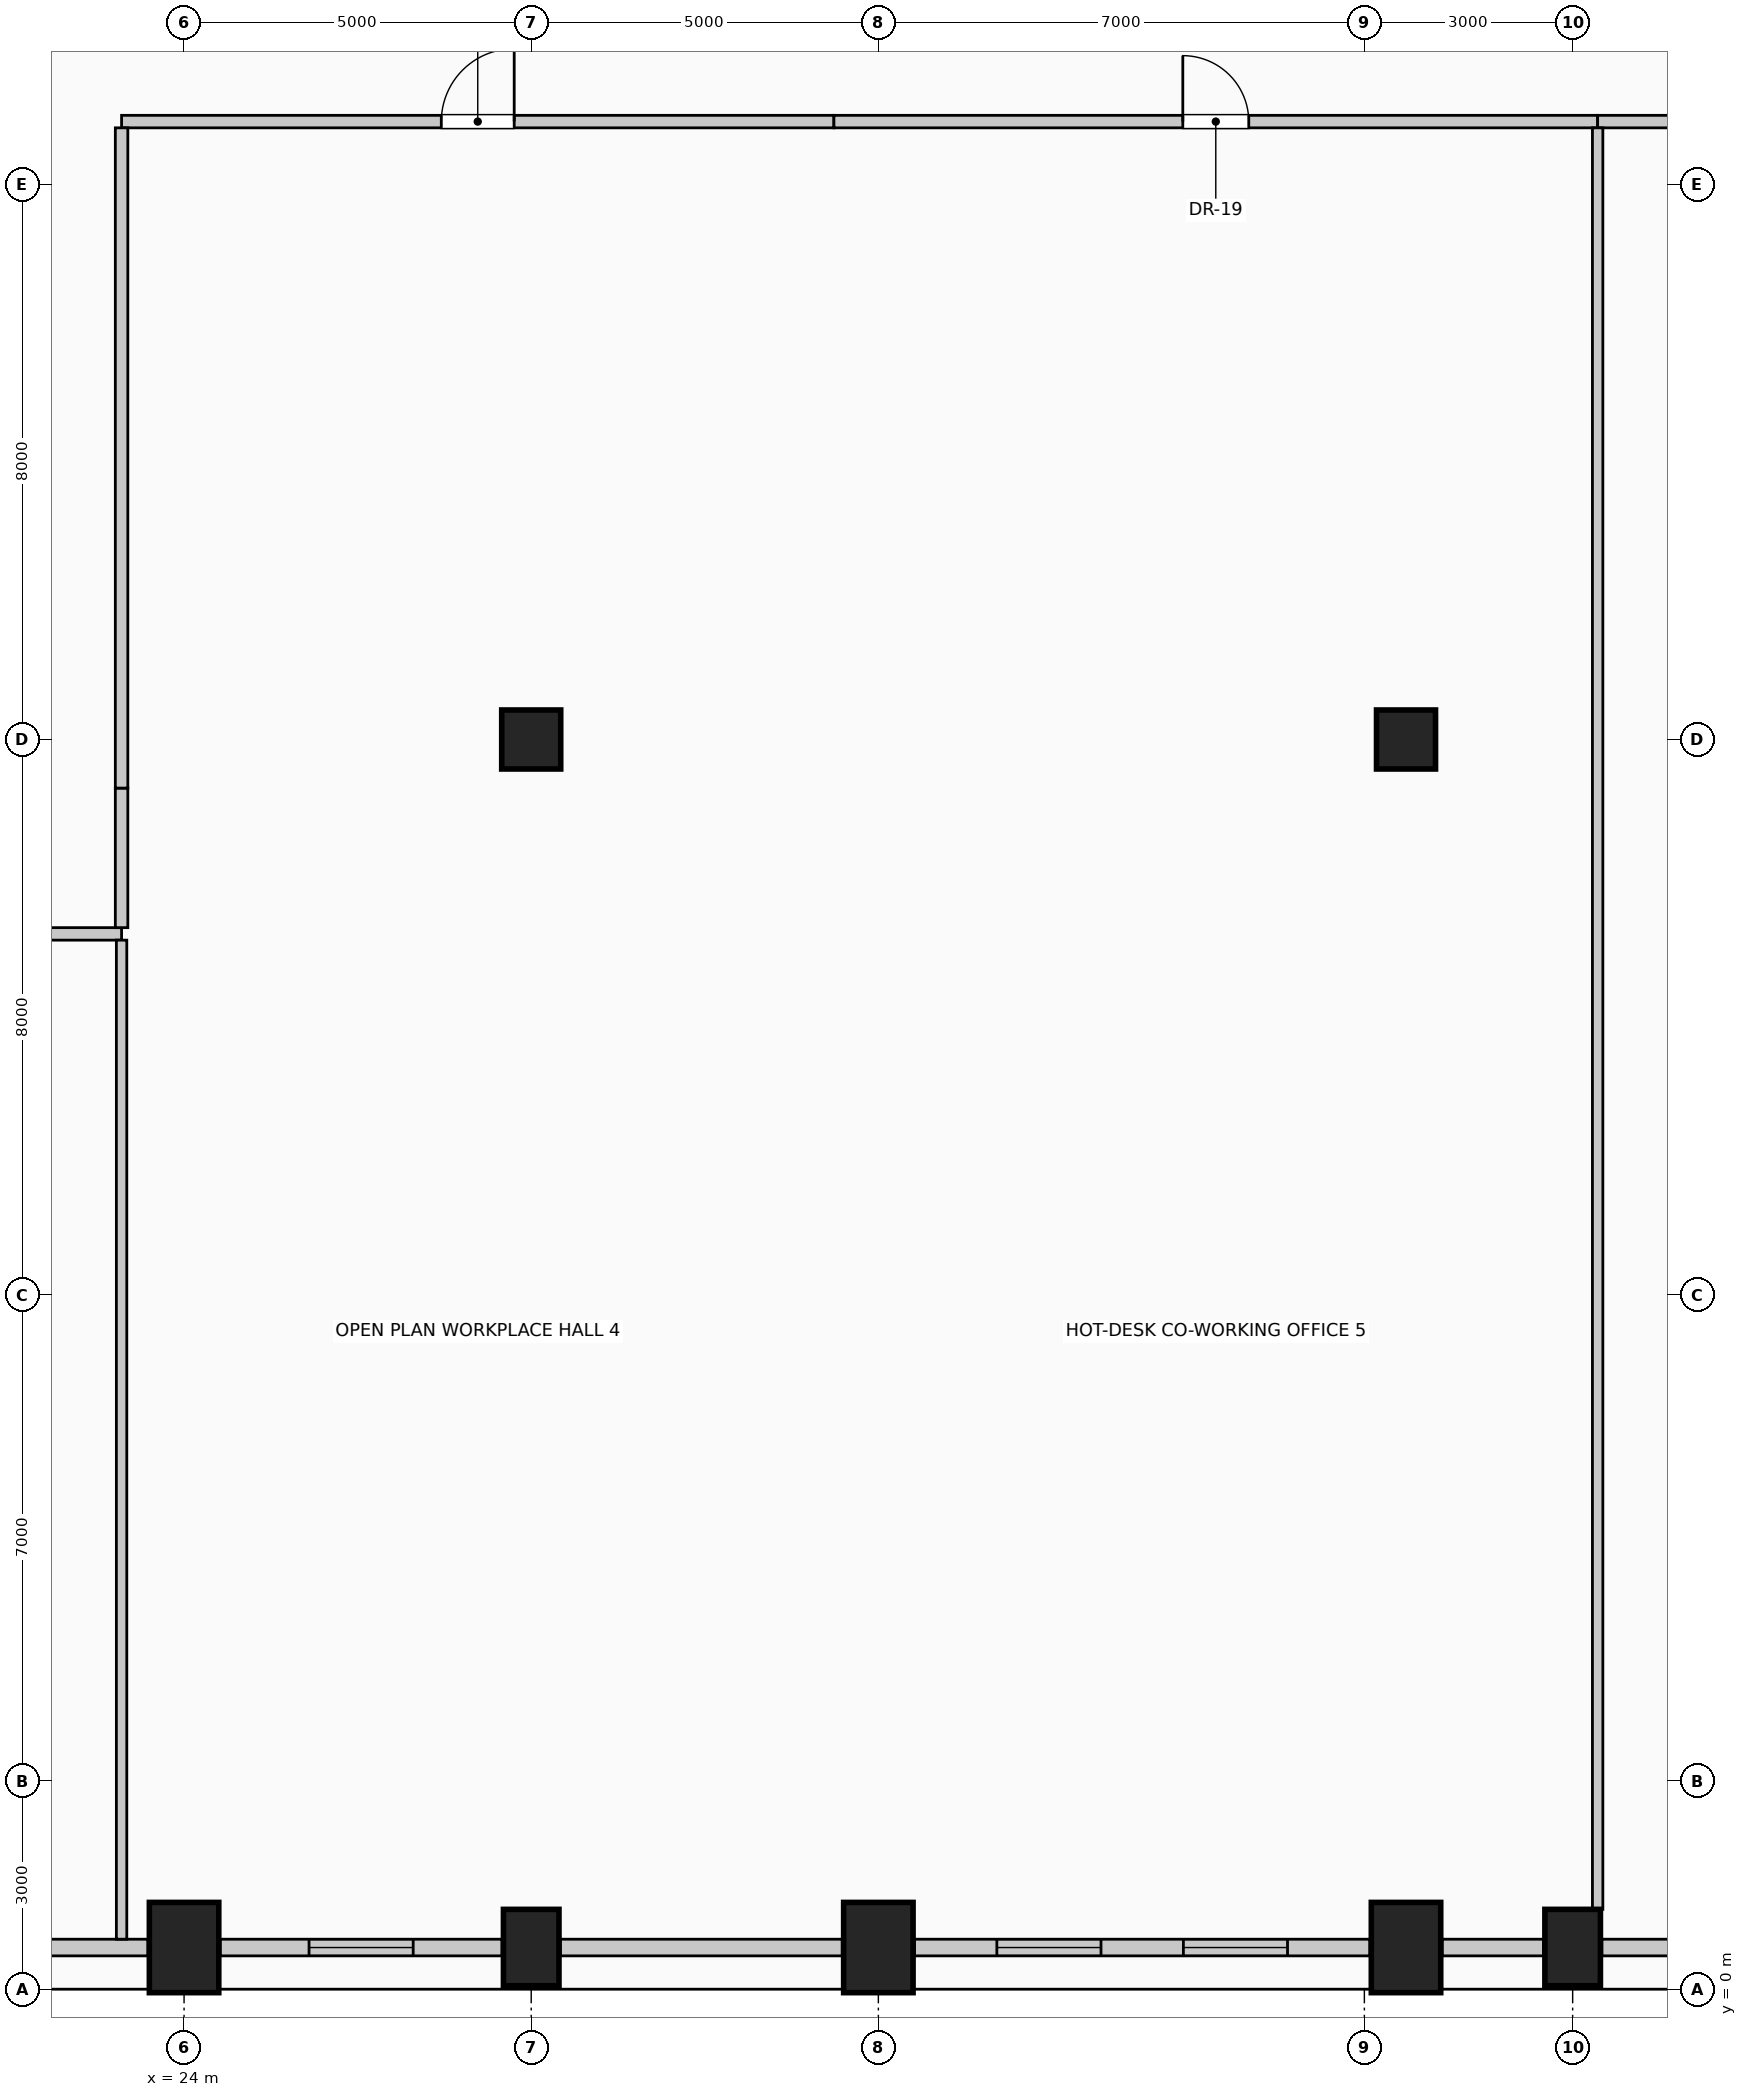
"""IFC4 building model, lengths in metres.
Left out: names, types, materials, properties, quantities, classifications, styles, units other than length and angle.
Written with IfcOpenShell. Run it as: python <this file> out.ifc"""

import sys

from ifc_helpers import new_model, si_unit, direction, frame, frame_2d, origin, origin_2d, place, context, subcontext, project, spatial, rectangle, circle, extrude, element, fill, save


model = new_model("IFC4")
c1 = context("Model", 3, precision=1e-05, world=origin(), true_north=direction((0.0, 1.0)))
c2 = subcontext(c1, "Body", "Model", "MODEL_VIEW")
j1 = project(units=[si_unit("LENGTHUNIT", "METRE"), si_unit("PLANEANGLEUNIT", "RADIAN")], contexts=[c1])
p1 = place(None, origin())
s1 = spatial("IfcSite", under=j1, at=p1, CompositionType="ELEMENT")
p2 = place(p1, origin())
s2 = spatial("IfcBuilding", under=s1, at=p2, CompositionType="ELEMENT")
p3 = place(p2, frame((0.0, 0.0, 178.6)))
s3 = spatial("IfcBuildingStorey", under=s2, at=p3, CompositionType="ELEMENT", Elevation=178.6)
p4 = place(p3, frame((24.0, 0.6, 0.0), z_axis=(0.0, 0.0, 1.0), x_axis=(1.0, 0.0, 0.0)))
e1 = element("IfcColumn", 1, at=p4, inside=s3, PredefinedType="COLUMN", context=c2, shape_type="SweptSolid", body=[
    extrude(rectangle(XDim=1.0, YDim=1.3, at=origin_2d()), origin(), (0.0, 0.0, 1.0), 4.0),
])
p5 = place(p3, frame((29.0, 0.6, 0.0), z_axis=(0.0, 0.0, 1.0), x_axis=(1.0, 0.0, 0.0)))
e2 = element("IfcColumn", 2, at=p5, inside=s3, PredefinedType="COLUMN", context=c2, shape_type="SweptSolid", body=[
    extrude(rectangle(XDim=0.8, YDim=1.1, at=origin_2d()), origin(), (0.0, 0.0, 1.0), 4.0),
])
for number, where, z_axis, x_axis in (
    (3, (34.0, 0.6, 0.0), (0.0, 0.0, 1.0), (1.0, 0.0, 0.0)),
    (4, (41.6, 0.6, 0.0), (0.0, 0.0, 1.0), (1.0, 0.0, 0.0)),
):
    element("IfcColumn", number, at=place(p3, frame(where, z_axis=z_axis, x_axis=x_axis)), inside=s3, PredefinedType="COLUMN", context=c2, shape_type="SweptSolid", body=[
        extrude(rectangle(XDim=1.0, YDim=1.3, at=origin_2d()), origin(), (0.0, 0.0, 1.0), 4.0),
    ])
p6 = place(p3, frame((44.0, 0.6, 0.0), z_axis=(0.0, 0.0, 1.0), x_axis=(1.0, 0.0, 0.0)))
e5 = element("IfcColumn", 5, at=p6, inside=s3, PredefinedType="COLUMN", context=c2, shape_type="SweptSolid", body=[
    extrude(rectangle(XDim=0.8, YDim=1.1, at=origin_2d()), origin(), (0.0, 0.0, 1.0), 4.0),
])
for number, where, z_axis, x_axis in (
    (6, (29.0, 18.0, 0.0), (0.0, 0.0, 1.0), (1.0, 0.0, 0.0)),
    (7, (41.6, 18.0, 0.0), (0.0, 0.0, 1.0), (1.0, 0.0, 0.0)),
):
    element("IfcColumn", number, at=place(p3, frame(where, z_axis=z_axis, x_axis=x_axis)), inside=s3, PredefinedType="COLUMN", context=c2, shape_type="SweptSolid", body=[
        extrude(circle(Radius=0.425, at=origin_2d()), origin(), (0.0, 0.0, 1.0), 4.0),
    ])
p7 = place(p3, frame((23.48, 0.6, 0.0), z_axis=(0.0, 0.0, 1.0), x_axis=(-1.0, 0.0, 0.0)))
e8 = element("IfcWall", 8, at=p7, inside=s3, PredefinedType="SOLIDWALL", context=c2, shape_type="SweptSolid", body=[
    extrude(rectangle(XDim=6.56, YDim=0.24, at=frame_2d((3.28, 0.0))), origin(), (0.0, 0.0, 1.0), 3.0),
])
p8 = place(p7, frame((3.873, 0.0, 0.42)))
e9 = element("IfcOpeningElement", 9, at=p8, cuts=e8, PredefinedType="OPENING", context=c2, shape_type="SweptSolid", body=[
    extrude(rectangle(XDim=1.5, YDim=2.2, at=frame_2d((0.75, 1.1))), frame((0.0, 0.13, 0.0), z_axis=(0.0, -1.0, 0.0), x_axis=(1.0, 0.0, 0.0)), (0.0, 0.0, 1.0), 0.26),
])
p9 = place(p3, frame((28.58, 0.6, 0.0), z_axis=(0.0, 0.0, 1.0), x_axis=(-1.0, 0.0, 0.0)))
e10 = element("IfcWall", 10, at=p9, inside=s3, PredefinedType="SOLIDWALL", context=c2, shape_type="SweptSolid", body=[
    extrude(rectangle(XDim=4.06, YDim=0.24, at=frame_2d((2.03, 0.0))), origin(), (0.0, 0.0, 1.0), 3.75),
])
p10 = place(p9, frame((1.28, 0.0, 0.42)))
e11 = element("IfcOpeningElement", 11, at=p10, cuts=e10, PredefinedType="OPENING", context=c2, shape_type="SweptSolid", body=[
    extrude(rectangle(XDim=1.5, YDim=2.2, at=frame_2d((0.75, 1.1))), frame((0.0, 0.13, 0.0), z_axis=(0.0, -1.0, 0.0), x_axis=(1.0, 0.0, 0.0)), (0.0, 0.0, 1.0), 0.26),
])
p11 = place(p3, frame((33.48, 0.6, 0.0), z_axis=(0.0, 0.0, 1.0), x_axis=(-1.0, 0.0, 0.0)))
e12 = element("IfcWall", 12, at=p11, inside=s3, PredefinedType="SOLIDWALL", context=c2, shape_type="SweptSolid", body=[
    extrude(rectangle(XDim=4.06, YDim=0.24, at=frame_2d((2.03, 0.0))), origin(), (0.0, 0.0, 1.0), 3.75),
])
p12 = place(p3, frame((41.08, 0.6, 0.0), z_axis=(0.0, 0.0, 1.0), x_axis=(-1.0, 0.0, 0.0)))
e13 = element("IfcWall", 13, at=p12, inside=s3, PredefinedType="SOLIDWALL", context=c2, shape_type="SweptSolid", body=[
    extrude(rectangle(XDim=6.56, YDim=0.24, at=frame_2d((3.28, 0.0))), origin(), (0.0, 0.0, 1.0), 3.0),
])
p13 = place(p12, frame((1.187, 0.0, 0.42)))
e14 = element("IfcOpeningElement", 14, at=p13, cuts=e13, PredefinedType="OPENING", context=c2, shape_type="SweptSolid", body=[
    extrude(rectangle(XDim=1.5, YDim=2.2, at=frame_2d((0.75, 1.1))), frame((0.0, 0.13, 0.0), z_axis=(0.0, -1.0, 0.0), x_axis=(1.0, 0.0, 0.0)), (0.0, 0.0, 1.0), 0.26),
])
p14 = place(p12, frame((3.873, 0.0, 0.42)))
e15 = element("IfcOpeningElement", 15, at=p14, cuts=e13, PredefinedType="OPENING", context=c2, shape_type="SweptSolid", body=[
    extrude(rectangle(XDim=1.5, YDim=2.2, at=frame_2d((0.75, 1.1))), frame((0.0, 0.13, 0.0), z_axis=(0.0, -1.0, 0.0), x_axis=(1.0, 0.0, 0.0)), (0.0, 0.0, 1.0), 0.26),
])
p15 = place(p3, frame((43.58, 0.6, 0.0), z_axis=(0.0, 0.0, 1.0), x_axis=(-1.0, 0.0, 0.0)))
e16 = element("IfcWall", 16, at=p15, inside=s3, PredefinedType="SOLIDWALL", context=c2, shape_type="SweptSolid", body=[
    extrude(rectangle(XDim=1.46, YDim=0.24, at=frame_2d((0.73, 0.0))), origin(), (0.0, 0.0, 1.0), 3.0),
])
p16 = place(p3, frame((49.08, 0.6, 0.0), z_axis=(0.0, 0.0, 1.0), x_axis=(-1.0, 0.0, 0.0)))
e17 = element("IfcWall", 17, at=p16, inside=s3, PredefinedType="SOLIDWALL", context=c2, shape_type="SweptSolid", body=[
    extrude(rectangle(XDim=4.66, YDim=0.24, at=frame_2d((2.33, 0.0))), origin(), (0.0, 0.0, 1.0), 3.0),
])
p17 = place(p3, frame((13.56, 15.2, 0.0), z_axis=(0.0, 0.0, 1.0), x_axis=(1.0, 0.0, 0.0)))
e18 = element("IfcWall", 18, at=p17, inside=s3, PredefinedType="PARTITIONING", context=c2, shape_type="SweptSolid", body=[
    extrude(rectangle(XDim=9.54, YDim=0.18, at=frame_2d((4.77, 0.0))), origin(), (0.0, 0.0, 1.0), 3.75),
])
p18 = place(p17, frame((4.295, 0.0, 0.0)))
e19 = element("IfcOpeningElement", 19, at=p18, cuts=e18, PredefinedType="OPENING", context=c2, shape_type="SweptSolid", body=[
    extrude(rectangle(XDim=0.95, YDim=2.15, at=frame_2d((0.475, 1.075))), frame((0.0, 0.1, 0.0), z_axis=(0.0, -1.0, 0.0), x_axis=(1.0, 0.0, 0.0)), (0.0, 0.0, 1.0), 0.2),
])
p19 = place(p3, frame((23.1, 26.9, 0.0), z_axis=(0.0, 0.0, 1.0), x_axis=(1.0, 0.0, 0.0)))
e20 = element("IfcWall", 20, at=p19, inside=s3, PredefinedType="PARTITIONING", context=c2, shape_type="SweptSolid", body=[
    extrude(rectangle(XDim=10.26, YDim=0.18, at=frame_2d((5.13, 0.0))), origin(), (0.0, 0.0, 1.0), 3.75),
])
p20 = place(p19, frame((4.605, 0.0, 0.0)))
e21 = element("IfcOpeningElement", 21, at=p20, cuts=e20, PredefinedType="OPENING", context=c2, shape_type="SweptSolid", body=[
    extrude(rectangle(XDim=1.05, YDim=2.15, at=frame_2d((0.525, 1.075))), frame((0.0, 0.1, 0.0), z_axis=(0.0, -1.0, 0.0), x_axis=(1.0, 0.0, 0.0)), (0.0, 0.0, 1.0), 0.2),
])
p21 = place(p3, frame((33.36, 26.9, 0.0), z_axis=(0.0, 0.0, 1.0), x_axis=(1.0, 0.0, 0.0)))
e22 = element("IfcWall", 22, at=p21, inside=s3, PredefinedType="PARTITIONING", context=c2, shape_type="SweptSolid", body=[
    extrude(rectangle(XDim=11.0, YDim=0.18, at=frame_2d((5.5, 0.0))), origin(), (0.0, 0.0, 1.0), 3.75),
])
p22 = place(p21, frame((5.025, 0.0, 0.0)))
e23 = element("IfcOpeningElement", 23, at=p22, cuts=e22, PredefinedType="OPENING", context=c2, shape_type="SweptSolid", body=[
    extrude(rectangle(XDim=0.95, YDim=2.15, at=frame_2d((0.475, 1.075))), frame((0.0, 0.1, 0.0), z_axis=(0.0, -1.0, 0.0), x_axis=(1.0, 0.0, 0.0)), (0.0, 0.0, 1.0), 0.2),
])
p23 = place(p3, frame((44.36, 26.9, 0.0), z_axis=(0.0, 0.0, 1.0), x_axis=(1.0, 0.0, 0.0)))
e24 = element("IfcWall", 24, at=p23, inside=s3, PredefinedType="PARTITIONING", context=c2, shape_type="SweptSolid", body=[
    extrude(rectangle(XDim=12.92, YDim=0.18, at=frame_2d((6.46, 0.0))), origin(), (0.0, 0.0, 1.0), 3.75),
])
p24 = place(p23, frame((5.935, 0.0, 0.0)))
e25 = element("IfcOpeningElement", 25, at=p24, cuts=e24, PredefinedType="OPENING", context=c2, shape_type="SweptSolid", body=[
    extrude(rectangle(XDim=1.05, YDim=2.15, at=frame_2d((0.525, 1.075))), frame((0.0, 0.1, 0.0), z_axis=(0.0, -1.0, 0.0), x_axis=(1.0, 0.0, 0.0)), (0.0, 0.0, 1.0), 0.2),
])
p25 = place(p3, frame((23.1, 0.72, 0.0), z_axis=(0.0, 0.0, 1.0), x_axis=(0.0, 1.0, 0.0)))
e26 = element("IfcWall", 26, at=p25, inside=s3, PredefinedType="PARTITIONING", context=c2, shape_type="SweptSolid", body=[
    extrude(rectangle(XDim=14.39, YDim=0.15, at=frame_2d((7.195, 0.0))), origin(), (0.0, 0.0, 1.0), 3.75),
])
p26 = place(p3, frame((23.1, 15.29, 0.0), z_axis=(0.0, 0.0, 1.0), x_axis=(0.0, 1.0, 0.0)))
e27 = element("IfcWall", 27, at=p26, inside=s3, PredefinedType="PARTITIONING", context=c2, shape_type="SweptSolid", body=[
    extrude(rectangle(XDim=2.01, YDim=0.18, at=frame_2d((1.005, 0.0))), origin(), (0.0, 0.0, 1.0), 3.75),
])
p27 = place(p3, frame((23.1, 17.3, 0.0), z_axis=(0.0, 0.0, 1.0), x_axis=(0.0, 1.0, 0.0)))
e28 = element("IfcWall", 28, at=p27, inside=s3, PredefinedType="PARTITIONING", context=c2, shape_type="SweptSolid", body=[
    extrude(rectangle(XDim=9.51, YDim=0.18, at=frame_2d((4.755, 0.0))), origin(), (0.0, 0.0, 1.0), 3.75),
])
p28 = place(p3, frame((44.36, 1.15, 0.0), z_axis=(0.0, 0.0, 1.0), x_axis=(0.0, 1.0, 0.0)))
e29 = element("IfcWall", 29, at=p28, inside=s3, PredefinedType="PARTITIONING", context=c2, shape_type="SweptSolid", body=[
    extrude(rectangle(XDim=25.66, YDim=0.15, at=frame_2d((12.83, 0.0))), origin(), (0.0, 0.0, 1.0), 3.75),
])
p29 = place(p10, origin())
e30 = element("IfcWindow", 30, at=p29, inside=s3, PartitioningType="SINGLE_PANEL", PredefinedType="WINDOW", context=c2, shape_type="SweptSolid", body=[
    extrude(rectangle(XDim=1.5, YDim=2.2, at=frame_2d((0.75, 1.1))), frame((0.0, 0.03, 0.0), z_axis=(0.0, -1.0, 0.0), x_axis=(1.0, 0.0, 0.0)), (0.0, 0.0, 1.0), 0.06),
])
fill(e11, e30)
p30 = place(p13, origin())
e31 = element("IfcWindow", 31, at=p30, inside=s3, PartitioningType="SINGLE_PANEL", PredefinedType="WINDOW", context=c2, shape_type="SweptSolid", body=[
    extrude(rectangle(XDim=1.5, YDim=2.2, at=frame_2d((0.75, 1.1))), frame((0.0, 0.03, 0.0), z_axis=(0.0, -1.0, 0.0), x_axis=(1.0, 0.0, 0.0)), (0.0, 0.0, 1.0), 0.06),
])
fill(e14, e31)
p31 = place(p14, origin())
e32 = element("IfcWindow", 32, at=p31, inside=s3, PartitioningType="SINGLE_PANEL", PredefinedType="WINDOW", context=c2, shape_type="SweptSolid", body=[
    extrude(rectangle(XDim=1.5, YDim=2.2, at=frame_2d((0.75, 1.1))), frame((0.0, 0.03, 0.0), z_axis=(0.0, -1.0, 0.0), x_axis=(1.0, 0.0, 0.0)), (0.0, 0.0, 1.0), 0.06),
])
fill(e15, e32)
p32 = place(p20, origin())
e33 = element("IfcDoor", 33, at=p32, inside=s3, OperationType="SINGLE_SWING_RIGHT", PredefinedType="DOOR", context=c2, shape_type="SweptSolid", body=[
    extrude(rectangle(XDim=1.05, YDim=2.15, at=frame_2d((0.525, 1.075))), frame((0.0, 0.025, 0.0), z_axis=(0.0, -1.0, 0.0), x_axis=(1.0, 0.0, 0.0)), (0.0, 0.0, 1.0), 0.05),
])
fill(e21, e33)
p33 = place(p22, origin())
e34 = element("IfcDoor", 34, at=p33, inside=s3, OperationType="SINGLE_SWING_LEFT", PredefinedType="DOOR", context=c2, shape_type="SweptSolid", body=[
    extrude(rectangle(XDim=0.95, YDim=2.15, at=frame_2d((0.475, 1.075))), frame((0.0, 0.025, 0.0), z_axis=(0.0, -1.0, 0.0), x_axis=(1.0, 0.0, 0.0)), (0.0, 0.0, 1.0), 0.05),
])
fill(e23, e34)
save(model, sys.argv[1])
